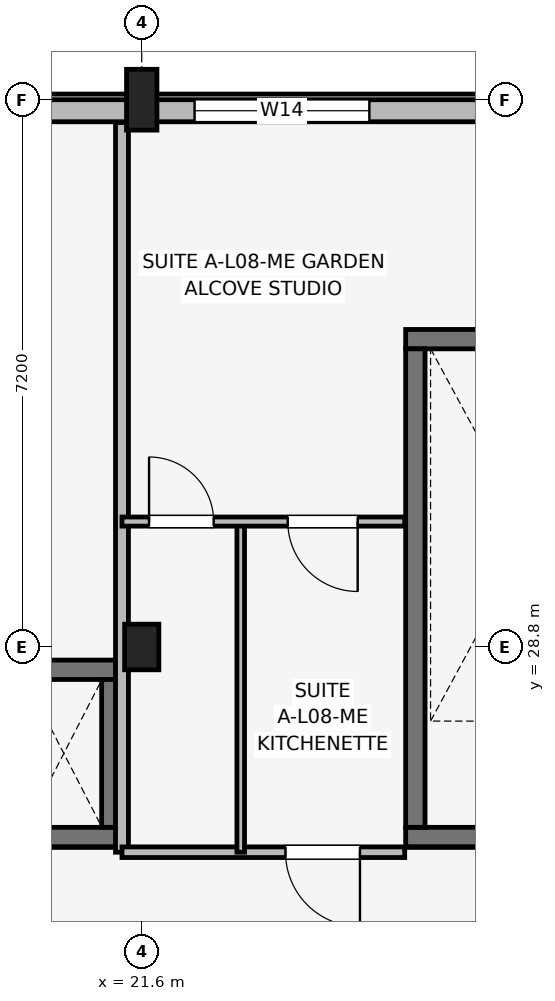
"""IFC4 building model, lengths in metres.
Left out: names, types, materials, properties, quantities, classifications, styles, units other than length and angle.
Written with IfcOpenShell. Run it as: python <this file> out.ifc"""

import sys

from ifc_helpers import new_model, si_unit, direction, frame, frame_2d, origin, origin_2d, place, context, subcontext, project, spatial, rectangle, extrude, element, fill, save


model = new_model("IFC4")
c1 = context("Model", 3, precision=1e-05, world=origin(), true_north=direction((0.0, 1.0)))
c2 = subcontext(c1, "Body", "Model", "MODEL_VIEW")
j1 = project(units=[si_unit("LENGTHUNIT", "METRE"), si_unit("PLANEANGLEUNIT", "RADIAN")], contexts=[c1])
p1 = place(None, origin())
s1 = spatial("IfcSite", under=j1, at=p1, CompositionType="ELEMENT")
p2 = place(p1, origin())
s2 = spatial("IfcBuilding", under=s1, at=p2, CompositionType="ELEMENT")
p3 = place(p2, frame((0.0, 0.0, 27.6)))
s3 = spatial("IfcBuildingStorey", under=s2, at=p3, CompositionType="ELEMENT", Elevation=27.6)
p4 = place(p3, frame((21.6, 28.8, 0.0), z_axis=(0.0, 0.0, 1.0), x_axis=(1.0, 0.0, 0.0)))
e1 = element("IfcColumn", 1, at=p4, inside=s3, PredefinedType="COLUMN", context=c2, shape_type="SweptSolid", body=[
    extrude(rectangle(XDim=0.45, YDim=0.6, at=origin_2d()), origin(), (0.0, 0.0, 1.0), 3.15),
])
p5 = place(p3, frame((21.6, 36.0, 0.0), z_axis=(0.0, 0.0, 1.0), x_axis=(1.0, 0.0, 0.0)))
e2 = element("IfcColumn", 2, at=p5, inside=s3, PredefinedType="COLUMN", context=c2, shape_type="SweptSolid", body=[
    extrude(rectangle(XDim=0.4, YDim=0.8, at=origin_2d()), origin(), (0.0, 0.0, 1.0), 3.15),
])
p6 = place(p3, frame((25.073, 26.3, 0.0), z_axis=(0.0, 0.0, 1.0), x_axis=(1.0, 0.0, 0.0)))
e3 = element("IfcWall", 3, at=p6, inside=s3, PredefinedType="SHEAR", context=c2, shape_type="SweptSolid", body=[
    extrude(rectangle(XDim=3.305, YDim=0.255, at=frame_2d((1.652, 0.0))), origin(), (0.0, 0.0, 1.0), 3.15),
])
p7 = place(p6, frame((1.127, 0.0, 0.0)))
e4 = element("IfcOpeningElement", 4, at=p7, cuts=e3, PredefinedType="OPENING", context=c2, shape_type="SweptSolid", body=[
    extrude(rectangle(XDim=1.05, YDim=2.12, at=frame_2d((0.525, 1.06))), frame((0.0, 0.137, 0.0), z_axis=(0.0, -1.0, 0.0), x_axis=(1.0, 0.0, 0.0)), (0.0, 0.0, 1.0), 0.275),
])
p8 = place(p3, frame((25.073, 32.85, 0.0), z_axis=(0.0, 0.0, 1.0), x_axis=(1.0, 0.0, 0.0)))
e5 = element("IfcWall", 5, at=p8, inside=s3, PredefinedType="SHEAR", context=c2, shape_type="SweptSolid", body=[
    extrude(rectangle(XDim=3.305, YDim=0.255, at=frame_2d((1.652, 0.0))), origin(), (0.0, 0.0, 1.0), 3.15),
])
p9 = place(p3, frame((25.2, 26.427, 0.0), z_axis=(0.0, 0.0, 1.0), x_axis=(0.0, 1.0, 0.0)))
e6 = element("IfcWall", 6, at=p9, inside=s3, PredefinedType="SHEAR", context=c2, shape_type="SweptSolid", body=[
    extrude(rectangle(XDim=6.295, YDim=0.255, at=frame_2d((3.147, 0.0))), origin(), (0.0, 0.0, 1.0), 3.15),
])
for number, where, z_axis, x_axis in (
    (7, (19.522, 26.3, 0.0), (0.0, 0.0, 1.0), (1.0, 0.0, 0.0)),
    (8, (19.522, 28.5, 0.0), (0.0, 0.0, 1.0), (1.0, 0.0, 0.0)),
):
    element("IfcWall", number, at=place(p3, frame(where, z_axis=z_axis, x_axis=x_axis)), inside=s3, PredefinedType="SHEAR", context=c2, shape_type="SweptSolid", body=[
        extrude(rectangle(XDim=1.805, YDim=0.255, at=frame_2d((0.902, 0.0))), origin(), (0.0, 0.0, 1.0), 3.15),
    ])
p10 = place(p3, frame((21.2, 26.427, 0.0), z_axis=(0.0, 0.0, 1.0), x_axis=(0.0, 1.0, 0.0)))
e9 = element("IfcWall", 9, at=p10, inside=s3, PredefinedType="SHEAR", context=c2, shape_type="SweptSolid", body=[
    extrude(rectangle(XDim=1.945, YDim=0.255, at=frame_2d((0.973, 0.0))), origin(), (0.0, 0.0, 1.0), 3.15),
])
p11 = place(p3, frame((33.4, 35.855, 0.0), z_axis=(0.0, 0.0, 1.0), x_axis=(-1.0, 0.0, 0.0)))
e10 = element("IfcWall", 10, at=p11, inside=s3, PredefinedType="SOLIDWALL", context=c2, shape_type="SweptSolid", body=[
    extrude(rectangle(XDim=30.8, YDim=0.29, at=frame_2d((15.4, 0.0))), origin(), (0.0, 0.0, 1.0), 2.43),
])
p12 = place(p11, frame((14.825, 0.0, 0.5)))
e11 = element("IfcOpeningElement", 11, at=p12, cuts=e10, PredefinedType="OPENING", context=c2, shape_type="SweptSolid", body=[
    extrude(rectangle(XDim=1.15, YDim=1.68, at=frame_2d((0.575, 0.84))), frame((0.0, 0.155, 0.0), z_axis=(0.0, -1.0, 0.0), x_axis=(1.0, 0.0, 0.0)), (0.0, 0.0, 1.0), 0.31),
])
p13 = place(p11, frame((1.265, 0.0, 0.67)))
e12 = element("IfcOpeningElement", 12, at=p13, cuts=e10, PredefinedType="OPENING", context=c2, shape_type="SweptSolid", body=[
    extrude(rectangle(XDim=2.0, YDim=1.65, at=frame_2d((1.0, 0.825))), frame((0.0, 0.155, 0.0), z_axis=(0.0, -1.0, 0.0), x_axis=(1.0, 0.0, 0.0)), (0.0, 0.0, 1.0), 0.31),
])
p14 = place(p11, frame((27.46, 0.0, 0.67)))
e13 = element("IfcOpeningElement", 13, at=p14, cuts=e10, PredefinedType="OPENING", context=c2, shape_type="SweptSolid", body=[
    extrude(rectangle(XDim=2.15, YDim=1.65, at=frame_2d((1.075, 0.825))), frame((0.0, 0.155, 0.0), z_axis=(0.0, -1.0, 0.0), x_axis=(1.0, 0.0, 0.0)), (0.0, 0.0, 1.0), 0.31),
])
p15 = place(p11, frame((8.805, 0.0, 0.67)))
e14 = element("IfcOpeningElement", 14, at=p15, cuts=e10, PredefinedType="OPENING", context=c2, shape_type="SweptSolid", body=[
    extrude(rectangle(XDim=2.3, YDim=1.65, at=frame_2d((1.15, 0.825))), frame((0.0, 0.155, 0.0), z_axis=(0.0, -1.0, 0.0), x_axis=(1.0, 0.0, 0.0)), (0.0, 0.0, 1.0), 0.31),
])
p16 = place(p11, frame((19.595, 0.0, 0.67)))
e15 = element("IfcOpeningElement", 15, at=p16, cuts=e10, PredefinedType="OPENING", context=c2, shape_type="SweptSolid", body=[
    extrude(rectangle(XDim=2.45, YDim=1.65, at=frame_2d((1.225, 0.825))), frame((0.0, 0.155, 0.0), z_axis=(0.0, -1.0, 0.0), x_axis=(1.0, 0.0, 0.0)), (0.0, 0.0, 1.0), 0.31),
])
p17 = place(p3, frame((21.34, 26.1, 0.0), z_axis=(0.0, 0.0, 1.0), x_axis=(0.0, 1.0, 0.0)))
e16 = element("IfcWall", 16, at=p17, inside=s3, PredefinedType="PARTITIONING", context=c2, shape_type="SweptSolid", body=[
    extrude(rectangle(XDim=9.6, YDim=0.17, at=frame_2d((4.8, 0.0))), origin(), (0.0, 0.0, 1.0), 2.38),
])
p18 = place(p3, frame((21.34, 26.1, 0.0), z_axis=(0.0, 0.0, 1.0), x_axis=(1.0, 0.0, 0.0)))
e17 = element("IfcWall", 17, at=p18, inside=s3, PredefinedType="PARTITIONING", context=c2, shape_type="SweptSolid", body=[
    extrude(rectangle(XDim=3.72, YDim=0.14, at=frame_2d((1.86, 0.0))), origin(), (0.0, 0.0, 1.0), 2.38),
])
p19 = place(p18, frame((3.131, 0.0, 0.0), z_axis=(0.0, 0.0, 1.0), x_axis=(-1.0, 0.0, 0.0)))
e18 = element("IfcOpeningElement", 18, at=p19, cuts=e17, PredefinedType="OPENING", context=c2, shape_type="SweptSolid", body=[
    extrude(rectangle(XDim=0.98, YDim=2.1, at=frame_2d((0.49, 1.05))), frame((0.0, 0.08, 0.0), z_axis=(0.0, -1.0, 0.0), x_axis=(1.0, 0.0, 0.0)), (0.0, 0.0, 1.0), 0.16),
])
p20 = place(p3, frame((22.902, 26.1, 0.0), z_axis=(0.0, 0.0, 1.0), x_axis=(0.0, 1.0, 0.0)))
e19 = element("IfcWall", 19, at=p20, inside=s3, PredefinedType="PARTITIONING", context=c2, shape_type="SweptSolid", body=[
    extrude(rectangle(XDim=4.35, YDim=0.1, at=frame_2d((2.175, 0.0))), origin(), (0.0, 0.0, 1.0), 2.38),
])
p21 = place(p3, frame((21.34, 30.45, 0.0), z_axis=(0.0, 0.0, 1.0), x_axis=(1.0, 0.0, 0.0)))
e20 = element("IfcWall", 20, at=p21, inside=s3, PredefinedType="PARTITIONING", context=c2, shape_type="SweptSolid", body=[
    extrude(rectangle(XDim=3.72, YDim=0.12, at=frame_2d((1.86, 0.0))), origin(), (0.0, 0.0, 1.0), 2.38),
])
p22 = place(p21, frame((0.356, 0.0, 0.0)))
e21 = element("IfcOpeningElement", 21, at=p22, cuts=e20, PredefinedType="OPENING", context=c2, shape_type="SweptSolid", body=[
    extrude(rectangle(XDim=0.85, YDim=2.08, at=frame_2d((0.425, 1.04))), frame((0.0, 0.07, 0.0), z_axis=(0.0, -1.0, 0.0), x_axis=(1.0, 0.0, 0.0)), (0.0, 0.0, 1.0), 0.14),
])
p23 = place(p21, frame((3.101, 0.0, 0.0), z_axis=(0.0, 0.0, 1.0), x_axis=(-1.0, 0.0, 0.0)))
e22 = element("IfcOpeningElement", 22, at=p23, cuts=e20, PredefinedType="OPENING", context=c2, shape_type="SweptSolid", body=[
    extrude(rectangle(XDim=0.92, YDim=2.08, at=frame_2d((0.46, 1.04))), frame((0.0, 0.07, 0.0), z_axis=(0.0, -1.0, 0.0), x_axis=(1.0, 0.0, 0.0)), (0.0, 0.0, 1.0), 0.14),
])
p24 = place(p15, origin())
e23 = element("IfcWindow", 23, at=p24, inside=s3, PartitioningType="SINGLE_PANEL", PredefinedType="WINDOW", context=c2, shape_type="SweptSolid", body=[
    extrude(rectangle(XDim=2.3, YDim=1.65, at=frame_2d((1.15, 0.825))), frame((0.0, 0.03, 0.0), z_axis=(0.0, -1.0, 0.0), x_axis=(1.0, 0.0, 0.0)), (0.0, 0.0, 1.0), 0.06),
])
fill(e14, e23)
p25 = place(p19, origin())
e24 = element("IfcDoor", 24, at=p25, inside=s3, OperationType="SINGLE_SWING_RIGHT", PredefinedType="DOOR", context=c2, shape_type="SweptSolid", body=[
    extrude(rectangle(XDim=0.98, YDim=2.1, at=frame_2d((0.49, 1.05))), frame((0.0, 0.025, 0.0), z_axis=(0.0, -1.0, 0.0), x_axis=(1.0, 0.0, 0.0)), (0.0, 0.0, 1.0), 0.05),
])
fill(e18, e24)
p26 = place(p22, origin())
e25 = element("IfcDoor", 25, at=p26, inside=s3, OperationType="SINGLE_SWING_LEFT", PredefinedType="DOOR", context=c2, shape_type="SweptSolid", body=[
    extrude(rectangle(XDim=0.85, YDim=2.08, at=frame_2d((0.425, 1.04))), frame((0.0, 0.025, 0.0), z_axis=(0.0, -1.0, 0.0), x_axis=(1.0, 0.0, 0.0)), (0.0, 0.0, 1.0), 0.05),
])
fill(e21, e25)
p27 = place(p23, origin())
e26 = element("IfcDoor", 26, at=p27, inside=s3, OperationType="SINGLE_SWING_RIGHT", PredefinedType="DOOR", context=c2, shape_type="SweptSolid", body=[
    extrude(rectangle(XDim=0.92, YDim=2.08, at=frame_2d((0.46, 1.04))), frame((0.0, 0.025, 0.0), z_axis=(0.0, -1.0, 0.0), x_axis=(1.0, 0.0, 0.0)), (0.0, 0.0, 1.0), 0.05),
])
fill(e22, e26)
save(model, sys.argv[1])
